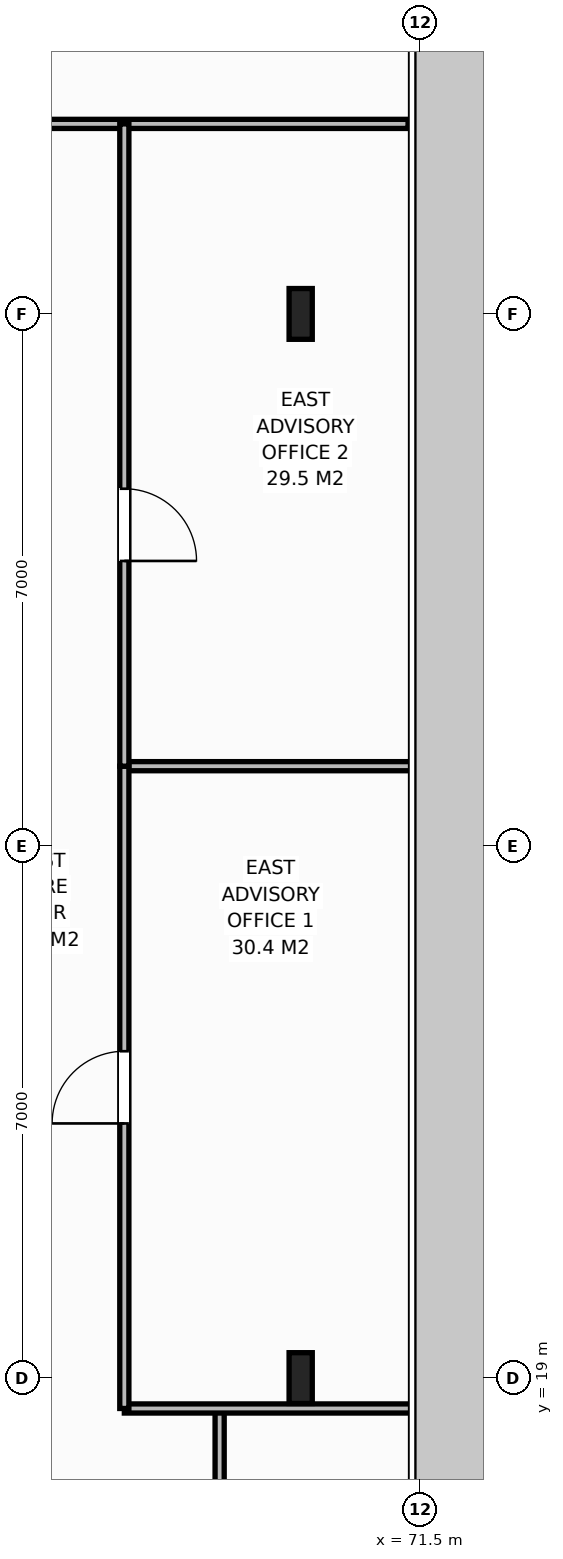
"""IFC4 building model, lengths in metres.
Left out: names, types, materials, properties, quantities, classifications, styles, units other than length and angle.
Written with IfcOpenShell. Run it as: python <this file> out.ifc"""

import sys

from ifc_helpers import new_model, si_unit, direction, frame, frame_2d, origin, origin_2d, place, context, subcontext, project, spatial, rectangle, i_section, extrude, element, fill, save


model = new_model("IFC4")
c1 = context("Model", 3, precision=1e-05, world=origin(), true_north=direction((0.0, 1.0)))
c2 = subcontext(c1, "Body", "Model", "MODEL_VIEW")
j1 = project(units=[si_unit("LENGTHUNIT", "METRE"), si_unit("PLANEANGLEUNIT", "RADIAN")], contexts=[c1])
p1 = place(None, origin())
s1 = spatial("IfcSite", under=j1, at=p1, CompositionType="ELEMENT")
p2 = place(p1, origin())
s2 = spatial("IfcBuilding", under=s1, at=p2, CompositionType="ELEMENT")
p3 = place(p2, frame((0.0, 0.0, 270.8)))
s3 = spatial("IfcBuildingStorey", under=s2, at=p3, CompositionType="ELEMENT", Elevation=270.8)
for number, where, z_axis, x_axis in (
    (1, (69.92, 19.0, 0.0), (0.0, 0.0, 1.0), (1.0, 0.0, 0.0)),
    (2, (69.92, 33.0, 0.0), (0.0, 0.0, 1.0), (1.0, 0.0, 0.0)),
):
    element("IfcColumn", number, at=place(p3, frame(where, z_axis=z_axis, x_axis=x_axis)), inside=s3, PredefinedType="COLUMN", context=c2, shape_type="SweptSolid", body=[
        extrude(i_section(OverallWidth=0.305, OverallDepth=0.668, WebThickness=0.021, FlangeThickness=0.04, at=origin_2d()), origin(), (0.0, 0.0, 1.0), 3.8),
    ])
p4 = place(p3, frame((68.854, 16.5, 0.0), z_axis=(0.0, 0.0, 1.0), x_axis=(0.0, 1.0, 0.0)))
e3 = element("IfcWall", 3, at=p4, inside=s3, PredefinedType="PARTITIONING", context=c2, shape_type="SweptSolid", body=[
    extrude(rectangle(XDim=2.1, YDim=0.12, at=frame_2d((1.05, 0.0))), origin(), (0.0, 0.0, 1.0), 3.588),
])
p5 = place(p3, frame((61.717, 35.5, 0.0), z_axis=(0.0, 0.0, 1.0), x_axis=(1.0, 0.0, 0.0)))
e4 = element("IfcWall", 4, at=p5, inside=s3, PredefinedType="PARTITIONING", context=c2, shape_type="SweptSolid", body=[
    extrude(rectangle(XDim=9.616, YDim=0.12, at=frame_2d((4.808, 0.0))), origin(), (0.0, 0.0, 1.0), 3.588),
])
p6 = place(p5, frame((0.48, 0.0, 0.0)))
e5 = element("IfcOpeningElement", 5, at=p6, cuts=e4, PredefinedType="OPENING", context=c2, shape_type="SweptSolid", body=[
    extrude(rectangle(XDim=0.95, YDim=2.15, at=frame_2d((0.475, 1.075))), frame((0.0, 0.07, 0.0), z_axis=(0.0, -1.0, 0.0), x_axis=(1.0, 0.0, 0.0)), (0.0, 0.0, 1.0), 0.14),
])
for number, where, z_axis, x_axis in (
    (6, (67.6, 18.6, 0.0), (0.0, 0.0, 1.0), (1.0, 0.0, 0.0)),
    (7, (67.6, 27.05, 0.0), (0.0, 0.0, 1.0), (1.0, 0.0, 0.0)),
):
    element("IfcWall", number, at=place(p3, frame(where, z_axis=z_axis, x_axis=x_axis)), inside=s3, PredefinedType="PARTITIONING", context=c2, shape_type="SweptSolid", body=[
        extrude(rectangle(XDim=3.893, YDim=0.12, at=frame_2d((1.946, 0.0))), origin(), (0.0, 0.0, 1.0), 3.588),
    ])
p7 = place(p3, frame((67.6, 18.6, 0.0), z_axis=(0.0, 0.0, 1.0), x_axis=(0.0, 1.0, 0.0)))
e8 = element("IfcWall", 8, at=p7, inside=s3, PredefinedType="PARTITIONING", context=c2, shape_type="SweptSolid", body=[
    extrude(rectangle(XDim=8.45, YDim=0.12, at=frame_2d((4.225, 0.0))), origin(), (0.0, 0.0, 1.0), 3.588),
])
p8 = place(p7, frame((3.75, 0.0, 0.0)))
e9 = element("IfcOpeningElement", 9, at=p8, cuts=e8, PredefinedType="OPENING", context=c2, shape_type="SweptSolid", body=[
    extrude(rectangle(XDim=0.95, YDim=2.15, at=frame_2d((0.475, 1.075))), frame((0.0, 0.07, 0.0), z_axis=(0.0, -1.0, 0.0), x_axis=(1.0, 0.0, 0.0)), (0.0, 0.0, 1.0), 0.14),
])
p9 = place(p3, frame((67.6, 27.05, 0.0), z_axis=(0.0, 0.0, 1.0), x_axis=(0.0, 1.0, 0.0)))
e10 = element("IfcWall", 10, at=p9, inside=s3, PredefinedType="PARTITIONING", context=c2, shape_type="SweptSolid", body=[
    extrude(rectangle(XDim=8.45, YDim=0.12, at=frame_2d((4.225, 0.0))), origin(), (0.0, 0.0, 1.0), 3.588),
])
p10 = place(p9, frame((2.7, 0.0, 0.0)))
e11 = element("IfcOpeningElement", 11, at=p10, cuts=e10, PredefinedType="OPENING", context=c2, shape_type="SweptSolid", body=[
    extrude(rectangle(XDim=0.95, YDim=2.15, at=frame_2d((0.475, 1.075))), frame((0.0, 0.07, 0.0), z_axis=(0.0, -1.0, 0.0), x_axis=(1.0, 0.0, 0.0)), (0.0, 0.0, 1.0), 0.14),
])
p11 = place(p8, origin())
e12 = element("IfcDoor", 12, at=p11, inside=s3, OperationType="SINGLE_SWING_LEFT", PredefinedType="DOOR", context=c2, shape_type="SweptSolid", body=[
    extrude(rectangle(XDim=0.95, YDim=2.15, at=frame_2d((0.475, 1.075))), frame((0.0, 0.025, 0.0), z_axis=(0.0, -1.0, 0.0), x_axis=(1.0, 0.0, 0.0)), (0.0, 0.0, 1.0), 0.05),
])
fill(e9, e12)
p12 = place(p10, origin())
e13 = element("IfcDoor", 13, at=p12, inside=s3, OperationType="SINGLE_SWING_RIGHT", PredefinedType="DOOR", context=c2, shape_type="SweptSolid", body=[
    extrude(rectangle(XDim=0.95, YDim=2.15, at=frame_2d((0.475, 1.075))), frame((0.0, 0.025, 0.0), z_axis=(0.0, -1.0, 0.0), x_axis=(1.0, 0.0, 0.0)), (0.0, 0.0, 1.0), 0.05),
])
fill(e11, e13)
save(model, sys.argv[1])
